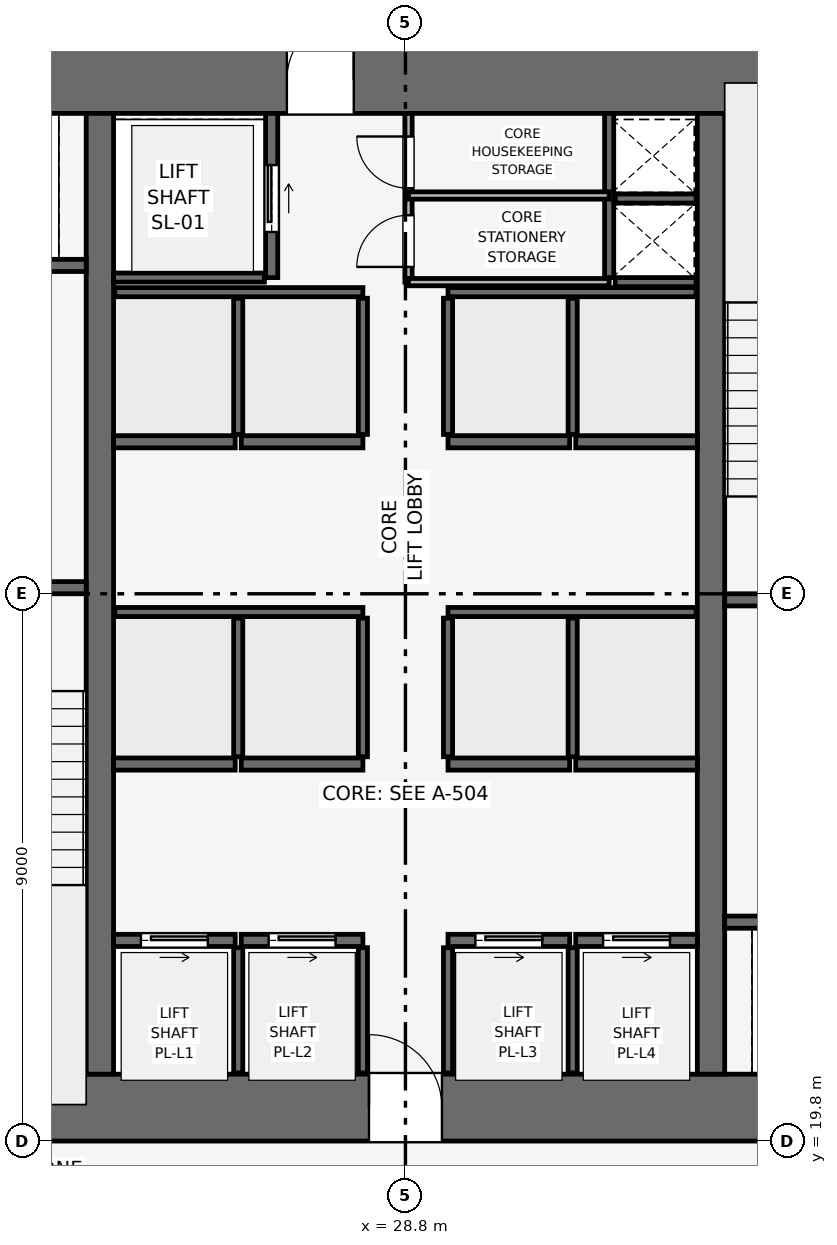
"""IFC4 building model, lengths in metres.
Left out: names, types, materials, properties, quantities, classifications, styles, units other than length and angle.
Written with IfcOpenShell. Run it as: python <this file> out.ifc"""

import sys

from ifc_helpers import new_model, si_unit, direction, frame, frame_2d, origin, place, context, subcontext, project, spatial, rectangle, extrude, element, fill, save


model = new_model("IFC4")
c1 = context("Model", 3, precision=1e-05, world=origin(), true_north=direction((0.0, 1.0)))
c2 = subcontext(c1, "Body", "Model", "MODEL_VIEW")
j1 = project(units=[si_unit("LENGTHUNIT", "METRE"), si_unit("PLANEANGLEUNIT", "RADIAN")], contexts=[c1])
p1 = place(None, origin())
s1 = spatial("IfcSite", under=j1, at=p1, CompositionType="ELEMENT")
p2 = place(p1, origin())
s2 = spatial("IfcBuilding", under=s1, at=p2, CompositionType="ELEMENT")
p3 = place(p2, frame((0.0, 0.0, 45.6)))
s3 = spatial("IfcBuildingStorey", under=s2, at=p3, CompositionType="ELEMENT", Elevation=45.6)
p4 = place(p3, frame((19.8, 20.35, 0.0), z_axis=(0.0, 0.0, 1.0), x_axis=(1.0, 0.0, 0.0)))
e1 = element("IfcWall", 1, at=p4, inside=s3, PredefinedType="SHEAR", context=c2, shape_type="SweptSolid", body=[
    extrude(rectangle(XDim=18.0, YDim=1.1, at=frame_2d((9.0, 0.0))), origin(), (0.0, 0.0, 1.0), 3.9),
])
p5 = place(p4, frame((8.4, 0.0, 0.0)))
e2 = element("IfcOpeningElement", 2, at=p5, cuts=e1, PredefinedType="OPENING", context=c2, shape_type="SweptSolid", body=[
    extrude(rectangle(XDim=1.2, YDim=2.2, at=frame_2d((0.6, 1.1))), frame((0.0, 0.56, 0.0), z_axis=(0.0, -1.0, 0.0), x_axis=(1.0, 0.0, 0.0)), (0.0, 0.0, 1.0), 1.12),
])
p6 = place(p3, frame((19.8, 37.25, 0.0), z_axis=(0.0, 0.0, 1.0), x_axis=(1.0, 0.0, 0.0)))
e3 = element("IfcWall", 3, at=p6, inside=s3, PredefinedType="SHEAR", context=c2, shape_type="SweptSolid", body=[
    extrude(rectangle(XDim=18.0, YDim=1.1, at=frame_2d((9.0, 0.0))), origin(), (0.0, 0.0, 1.0), 3.9),
])
p7 = place(p6, frame((7.05, 0.0, 0.0)))
e4 = element("IfcOpeningElement", 4, at=p7, cuts=e3, PredefinedType="OPENING", context=c2, shape_type="SweptSolid", body=[
    extrude(rectangle(XDim=1.1, YDim=2.15, at=frame_2d((0.55, 1.075))), frame((0.0, 0.56, 0.0), z_axis=(0.0, -1.0, 0.0), x_axis=(1.0, 0.0, 0.0)), (0.0, 0.0, 1.0), 1.12),
])
for number, where, z_axis, x_axis in (
    (5, (23.775, 20.9, 0.0), (0.0, 0.0, 1.0), (0.0, 1.0, 0.0)),
    (6, (33.825, 20.9, 0.0), (0.0, 0.0, 1.0), (0.0, 1.0, 0.0)),
):
    element("IfcWall", number, at=place(p3, frame(where, z_axis=z_axis, x_axis=x_axis)), inside=s3, PredefinedType="SHEAR", context=c2, shape_type="SweptSolid", body=[
        extrude(rectangle(XDim=15.8, YDim=0.45, at=frame_2d((7.9, 0.0))), origin(), (0.0, 0.0, 1.0), 3.9),
    ])
p8 = place(p3, frame((20.4, 28.9, 0.0), z_axis=(0.0, 0.0, 1.0), x_axis=(1.0, 0.0, 0.0)))
e7 = element("IfcWall", 7, at=p8, inside=s3, PredefinedType="SHEAR", context=c2, shape_type="SweptSolid", body=[
    extrude(rectangle(XDim=3.15, YDim=0.2, at=frame_2d((1.575, 0.0))), origin(), (0.0, 0.0, 1.0), 3.65),
])
p9 = place(p8, frame((0.8, 0.0, 0.0)))
e8 = element("IfcOpeningElement", 8, at=p9, cuts=e7, PredefinedType="OPENING", context=c2, shape_type="SweptSolid", body=[
    extrude(rectangle(XDim=1.0, YDim=2.1, at=frame_2d((0.5, 1.05))), frame((0.0, 0.11, 0.0), z_axis=(0.0, -1.0, 0.0), x_axis=(1.0, 0.0, 0.0)), (0.0, 0.0, 1.0), 0.22),
])
p10 = place(p3, frame((34.05, 28.7, 0.0), z_axis=(0.0, 0.0, 1.0), x_axis=(1.0, 0.0, 0.0)))
e9 = element("IfcWall", 9, at=p10, inside=s3, PredefinedType="SHEAR", context=c2, shape_type="SweptSolid", body=[
    extrude(rectangle(XDim=3.15, YDim=0.2, at=frame_2d((1.575, 0.0))), origin(), (0.0, 0.0, 1.0), 3.65),
])
p11 = place(p10, frame((0.8, 0.0, 0.0)))
e10 = element("IfcOpeningElement", 10, at=p11, cuts=e9, PredefinedType="OPENING", context=c2, shape_type="SweptSolid", body=[
    extrude(rectangle(XDim=1.0, YDim=2.1, at=frame_2d((0.5, 1.05))), frame((0.0, 0.11, 0.0), z_axis=(0.0, -1.0, 0.0), x_axis=(1.0, 0.0, 0.0)), (0.0, 0.0, 1.0), 0.22),
])
p12 = place(p3, frame((32.15, 34.0, 0.0), z_axis=(0.0, 0.0, 1.0), x_axis=(0.0, 1.0, 0.0)))
e11 = element("IfcWall", 11, at=p12, inside=s3, PredefinedType="SHEAR", context=c2, shape_type="SweptSolid", body=[
    extrude(rectangle(XDim=2.7, YDim=0.15, at=frame_2d((1.35, 0.0))), origin(), (0.0, 0.0, 1.0), 3.65),
])
for number, where, z_axis, x_axis in (
    (12, (32.25, 33.925, 0.0), (0.0, 0.0, 1.0), (1.0, 0.0, 0.0)),
    (13, (32.25, 35.3, 0.0), (0.0, 0.0, 1.0), (1.0, 0.0, 0.0)),
):
    element("IfcWall", number, at=place(p3, frame(where, z_axis=z_axis, x_axis=x_axis)), inside=s3, PredefinedType="SHEAR", context=c2, shape_type="SweptSolid", body=[
        extrude(rectangle(XDim=1.33, YDim=0.15, at=frame_2d((0.665, 0.0))), origin(), (0.0, 0.0, 1.0), 3.65),
    ])
p13 = place(p3, frame((20.5, 34.2, 0.0), z_axis=(0.0, 0.0, 1.0), x_axis=(1.0, 0.0, 0.0)))
e14 = element("IfcWall", 14, at=p13, inside=s3, PredefinedType="SHEAR", context=c2, shape_type="SweptSolid", body=[
    extrude(rectangle(XDim=3.05, YDim=0.2, at=frame_2d((1.525, 0.0))), origin(), (0.0, 0.0, 1.0), 3.65),
])
p14 = place(p13, frame((0.75, 0.0, 0.0)))
e15 = element("IfcOpeningElement", 15, at=p14, cuts=e14, PredefinedType="OPENING", context=c2, shape_type="SweptSolid", body=[
    extrude(rectangle(XDim=1.1, YDim=2.15, at=frame_2d((0.55, 1.075))), frame((0.0, 0.11, 0.0), z_axis=(0.0, -1.0, 0.0), x_axis=(1.0, 0.0, 0.0)), (0.0, 0.0, 1.0), 0.22),
])
p15 = place(p3, frame((34.05, 23.4, 0.0), z_axis=(0.0, 0.0, 1.0), x_axis=(1.0, 0.0, 0.0)))
e16 = element("IfcWall", 16, at=p15, inside=s3, PredefinedType="SHEAR", context=c2, shape_type="SweptSolid", body=[
    extrude(rectangle(XDim=3.05, YDim=0.2, at=frame_2d((1.525, 0.0))), origin(), (0.0, 0.0, 1.0), 3.65),
])
p16 = place(p15, frame((1.2, 0.0, 0.0)))
e17 = element("IfcOpeningElement", 17, at=p16, cuts=e16, PredefinedType="OPENING", context=c2, shape_type="SweptSolid", body=[
    extrude(rectangle(XDim=1.1, YDim=2.15, at=frame_2d((0.55, 1.075))), frame((0.0, 0.11, 0.0), z_axis=(0.0, -1.0, 0.0), x_axis=(1.0, 0.0, 0.0)), (0.0, 0.0, 1.0), 0.22),
])
p17 = place(p3, frame((26.6, 34.0, 0.0), z_axis=(0.0, 0.0, 1.0), x_axis=(0.0, 1.0, 0.0)))
e18 = element("IfcWall", 18, at=p17, inside=s3, PredefinedType="SHEAR", context=c2, shape_type="SweptSolid", body=[
    extrude(rectangle(XDim=2.7, YDim=0.2, at=frame_2d((1.35, 0.0))), origin(), (0.0, 0.0, 1.0), 3.65),
])
p18 = place(p17, frame((0.75, 0.0, 0.0)))
e19 = element("IfcOpeningElement", 19, at=p18, cuts=e18, PredefinedType="OPENING", context=c2, shape_type="SweptSolid", body=[
    extrude(rectangle(XDim=1.1, YDim=2.15, at=frame_2d((0.55, 1.075))), frame((0.0, 0.11, 0.0), z_axis=(0.0, -1.0, 0.0), x_axis=(1.0, 0.0, 0.0)), (0.0, 0.0, 1.0), 0.22),
])
p19 = place(p3, frame((24.0, 34.0, 0.0), z_axis=(0.0, 0.0, 1.0), x_axis=(1.0, 0.0, 0.0)))
e20 = element("IfcWall", 20, at=p19, inside=s3, PredefinedType="SHEAR", context=c2, shape_type="SweptSolid", body=[
    extrude(rectangle(XDim=2.48, YDim=0.15, at=frame_2d((1.24, 0.0))), origin(), (0.0, 0.0, 1.0), 3.65),
])
p20 = place(p3, frame((24.0, 23.1, 0.0), z_axis=(0.0, 0.0, 1.0), x_axis=(1.0, 0.0, 0.0)))
e21 = element("IfcWall", 21, at=p20, inside=s3, PredefinedType="SHEAR", context=c2, shape_type="SweptSolid", body=[
    extrude(rectangle(XDim=2.0, YDim=0.2, at=frame_2d((1.0, 0.0))), origin(), (0.0, 0.0, 1.0), 3.65),
])
p21 = place(p20, frame((0.45, 0.0, 0.0)))
e22 = element("IfcOpeningElement", 22, at=p21, cuts=e21, PredefinedType="OPENING", context=c2, shape_type="SweptSolid", body=[
    extrude(rectangle(XDim=1.1, YDim=2.15, at=frame_2d((0.55, 1.075))), frame((0.0, 0.11, 0.0), z_axis=(0.0, -1.0, 0.0), x_axis=(1.0, 0.0, 0.0)), (0.0, 0.0, 1.0), 0.22),
])
p22 = place(p3, frame((26.1, 23.1, 0.0), z_axis=(0.0, 0.0, 1.0), x_axis=(1.0, 0.0, 0.0)))
e23 = element("IfcWall", 23, at=p22, inside=s3, PredefinedType="SHEAR", context=c2, shape_type="SweptSolid", body=[
    extrude(rectangle(XDim=2.0, YDim=0.2, at=frame_2d((1.0, 0.0))), origin(), (0.0, 0.0, 1.0), 3.65),
])
p23 = place(p22, frame((0.45, 0.0, 0.0)))
e24 = element("IfcOpeningElement", 24, at=p23, cuts=e23, PredefinedType="OPENING", context=c2, shape_type="SweptSolid", body=[
    extrude(rectangle(XDim=1.1, YDim=2.15, at=frame_2d((0.55, 1.075))), frame((0.0, 0.11, 0.0), z_axis=(0.0, -1.0, 0.0), x_axis=(1.0, 0.0, 0.0)), (0.0, 0.0, 1.0), 0.22),
])
p24 = place(p3, frame((29.5, 23.1, 0.0), z_axis=(0.0, 0.0, 1.0), x_axis=(1.0, 0.0, 0.0)))
e25 = element("IfcWall", 25, at=p24, inside=s3, PredefinedType="SHEAR", context=c2, shape_type="SweptSolid", body=[
    extrude(rectangle(XDim=2.0, YDim=0.2, at=frame_2d((1.0, 0.0))), origin(), (0.0, 0.0, 1.0), 3.65),
])
p25 = place(p24, frame((0.45, 0.0, 0.0)))
e26 = element("IfcOpeningElement", 26, at=p25, cuts=e25, PredefinedType="OPENING", context=c2, shape_type="SweptSolid", body=[
    extrude(rectangle(XDim=1.1, YDim=2.15, at=frame_2d((0.55, 1.075))), frame((0.0, 0.11, 0.0), z_axis=(0.0, -1.0, 0.0), x_axis=(1.0, 0.0, 0.0)), (0.0, 0.0, 1.0), 0.22),
])
p26 = place(p3, frame((31.6, 23.1, 0.0), z_axis=(0.0, 0.0, 1.0), x_axis=(1.0, 0.0, 0.0)))
e27 = element("IfcWall", 27, at=p26, inside=s3, PredefinedType="SHEAR", context=c2, shape_type="SweptSolid", body=[
    extrude(rectangle(XDim=2.0, YDim=0.2, at=frame_2d((1.0, 0.0))), origin(), (0.0, 0.0, 1.0), 3.65),
])
p27 = place(p26, frame((0.45, 0.0, 0.0)))
e28 = element("IfcOpeningElement", 28, at=p27, cuts=e27, PredefinedType="OPENING", context=c2, shape_type="SweptSolid", body=[
    extrude(rectangle(XDim=1.1, YDim=2.15, at=frame_2d((0.55, 1.075))), frame((0.0, 0.11, 0.0), z_axis=(0.0, -1.0, 0.0), x_axis=(1.0, 0.0, 0.0)), (0.0, 0.0, 1.0), 0.22),
])
for number, where, z_axis, x_axis in (
    (29, (24.0, 26.0, 0.0), (0.0, 0.0, 1.0), (1.0, 0.0, 0.0)),
    (30, (26.1, 26.0, 0.0), (0.0, 0.0, 1.0), (1.0, 0.0, 0.0)),
    (31, (29.5, 26.0, 0.0), (0.0, 0.0, 1.0), (1.0, 0.0, 0.0)),
    (32, (31.6, 26.0, 0.0), (0.0, 0.0, 1.0), (1.0, 0.0, 0.0)),
    (33, (24.0, 31.3, 0.0), (0.0, 0.0, 1.0), (1.0, 0.0, 0.0)),
    (34, (26.1, 31.3, 0.0), (0.0, 0.0, 1.0), (1.0, 0.0, 0.0)),
    (35, (29.5, 31.3, 0.0), (0.0, 0.0, 1.0), (1.0, 0.0, 0.0)),
    (36, (31.6, 31.3, 0.0), (0.0, 0.0, 1.0), (1.0, 0.0, 0.0)),
):
    element("IfcWall", number, at=place(p3, frame(where, z_axis=z_axis, x_axis=x_axis)), inside=s3, PredefinedType="SHEAR", context=c2, shape_type="SweptSolid", body=[
        extrude(rectangle(XDim=2.0, YDim=0.2, at=frame_2d((1.0, 0.0))), origin(), (0.0, 0.0, 1.0), 3.65),
    ])
for number, where, z_axis, x_axis in (
    (37, (26.05, 20.92, 0.0), (0.0, 0.0, 1.0), (0.0, 1.0, 0.0)),
    (38, (28.1, 20.92, 0.0), (0.0, 0.0, 1.0), (0.0, 1.0, 0.0)),
    (39, (29.5, 20.92, 0.0), (0.0, 0.0, 1.0), (0.0, 1.0, 0.0)),
    (40, (31.55, 20.92, 0.0), (0.0, 0.0, 1.0), (0.0, 1.0, 0.0)),
):
    element("IfcWall", number, at=place(p3, frame(where, z_axis=z_axis, x_axis=x_axis)), inside=s3, PredefinedType="SHEAR", context=c2, shape_type="SweptSolid", body=[
        extrude(rectangle(XDim=2.06, YDim=0.15, at=frame_2d((1.03, 0.0))), origin(), (0.0, 0.0, 1.0), 3.65),
    ])
for number, where, z_axis, x_axis in (
    (41, (24.02, 28.5, 0.0), (0.0, 0.0, 1.0), (1.0, 0.0, 0.0)),
    (42, (29.5, 28.5, 0.0), (0.0, 0.0, 1.0), (1.0, 0.0, 0.0)),
):
    element("IfcWall", number, at=place(p3, frame(where, z_axis=z_axis, x_axis=x_axis)), inside=s3, PredefinedType="SHEAR", context=c2, shape_type="SweptSolid", body=[
        extrude(rectangle(XDim=4.08, YDim=0.15, at=frame_2d((2.04, 0.0))), origin(), (0.0, 0.0, 1.0), 3.65),
    ])
for number, where, z_axis, x_axis in (
    (43, (26.05, 26.12, 0.0), (0.0, 0.0, 1.0), (0.0, 1.0, 0.0)),
    (44, (28.1, 26.12, 0.0), (0.0, 0.0, 1.0), (0.0, 1.0, 0.0)),
    (45, (29.5, 26.12, 0.0), (0.0, 0.0, 1.0), (0.0, 1.0, 0.0)),
    (46, (31.55, 26.12, 0.0), (0.0, 0.0, 1.0), (0.0, 1.0, 0.0)),
):
    element("IfcWall", number, at=place(p3, frame(where, z_axis=z_axis, x_axis=x_axis)), inside=s3, PredefinedType="SHEAR", context=c2, shape_type="SweptSolid", body=[
        extrude(rectangle(XDim=2.28, YDim=0.15, at=frame_2d((1.14, 0.0))), origin(), (0.0, 0.0, 1.0), 3.65),
    ])
for number, where, z_axis, x_axis in (
    (47, (24.02, 33.76, 0.0), (0.0, 0.0, 1.0), (1.0, 0.0, 0.0)),
    (48, (29.5, 33.76, 0.0), (0.0, 0.0, 1.0), (1.0, 0.0, 0.0)),
):
    element("IfcWall", number, at=place(p3, frame(where, z_axis=z_axis, x_axis=x_axis)), inside=s3, PredefinedType="SHEAR", context=c2, shape_type="SweptSolid", body=[
        extrude(rectangle(XDim=4.08, YDim=0.15, at=frame_2d((2.04, 0.0))), origin(), (0.0, 0.0, 1.0), 3.65),
    ])
for number, where, z_axis, x_axis in (
    (49, (26.05, 31.42, 0.0), (0.0, 0.0, 1.0), (0.0, 1.0, 0.0)),
    (50, (28.1, 31.42, 0.0), (0.0, 0.0, 1.0), (0.0, 1.0, 0.0)),
    (51, (29.5, 31.42, 0.0), (0.0, 0.0, 1.0), (0.0, 1.0, 0.0)),
    (52, (31.55, 31.42, 0.0), (0.0, 0.0, 1.0), (0.0, 1.0, 0.0)),
):
    element("IfcWall", number, at=place(p3, frame(where, z_axis=z_axis, x_axis=x_axis)), inside=s3, PredefinedType="SHEAR", context=c2, shape_type="SweptSolid", body=[
        extrude(rectangle(XDim=2.24, YDim=0.15, at=frame_2d((1.12, 0.0))), origin(), (0.0, 0.0, 1.0), 3.65),
    ])
p28 = place(p3, frame((28.85, 33.925, 0.0), z_axis=(0.0, 0.0, 1.0), x_axis=(0.0, 1.0, 0.0)))
e53 = element("IfcWall", 53, at=p28, inside=s3, PredefinedType="PARTITIONING", context=c2, shape_type="SweptSolid", body=[
    extrude(rectangle(XDim=2.775, YDim=0.12, at=frame_2d((1.387, 0.0))), origin(), (0.0, 0.0, 1.0), 3.65),
])
p29 = place(p28, frame((0.25, 0.0, 0.0)))
e54 = element("IfcOpeningElement", 54, at=p29, cuts=e53, PredefinedType="OPENING", context=c2, shape_type="SweptSolid", body=[
    extrude(rectangle(XDim=0.85, YDim=2.1, at=frame_2d((0.425, 1.05))), frame((0.0, 0.07, 0.0), z_axis=(0.0, -1.0, 0.0), x_axis=(1.0, 0.0, 0.0)), (0.0, 0.0, 1.0), 0.14),
])
p30 = place(p28, frame((1.545, 0.0, 0.0)))
e55 = element("IfcOpeningElement", 55, at=p30, cuts=e53, PredefinedType="OPENING", context=c2, shape_type="SweptSolid", body=[
    extrude(rectangle(XDim=0.85, YDim=2.1, at=frame_2d((0.425, 1.05))), frame((0.0, 0.07, 0.0), z_axis=(0.0, -1.0, 0.0), x_axis=(1.0, 0.0, 0.0)), (0.0, 0.0, 1.0), 0.14),
])
for number, where, z_axis, x_axis in (
    (56, (28.85, 35.35, 0.0), (0.0, 0.0, 1.0), (1.0, 0.0, 0.0)),
    (57, (28.85, 33.925, 0.0), (0.0, 0.0, 1.0), (1.0, 0.0, 0.0)),
):
    element("IfcWall", number, at=place(p3, frame(where, z_axis=z_axis, x_axis=x_axis)), inside=s3, PredefinedType="PARTITIONING", context=c2, shape_type="SweptSolid", body=[
        extrude(rectangle(XDim=3.3, YDim=0.12, at=frame_2d((1.65, 0.0))), origin(), (0.0, 0.0, 1.0), 3.65),
    ])
p31 = place(p18, origin())
e58 = element("IfcDoor", 58, at=p31, inside=s3, OperationType="SLIDING_TO_RIGHT", PredefinedType="DOOR", context=c2, shape_type="SweptSolid", body=[
    extrude(rectangle(XDim=1.1, YDim=2.15, at=frame_2d((0.55, 1.075))), frame((0.0, 0.025, 0.0), z_axis=(0.0, -1.0, 0.0), x_axis=(1.0, 0.0, 0.0)), (0.0, 0.0, 1.0), 0.05),
])
fill(e19, e58)
p32 = place(p21, origin())
e59 = element("IfcDoor", 59, at=p32, inside=s3, OperationType="SLIDING_TO_RIGHT", PredefinedType="DOOR", context=c2, shape_type="SweptSolid", body=[
    extrude(rectangle(XDim=1.1, YDim=2.15, at=frame_2d((0.55, 1.075))), frame((0.0, 0.025, 0.0), z_axis=(0.0, -1.0, 0.0), x_axis=(1.0, 0.0, 0.0)), (0.0, 0.0, 1.0), 0.05),
])
fill(e22, e59)
p33 = place(p23, origin())
e60 = element("IfcDoor", 60, at=p33, inside=s3, OperationType="SLIDING_TO_RIGHT", PredefinedType="DOOR", context=c2, shape_type="SweptSolid", body=[
    extrude(rectangle(XDim=1.1, YDim=2.15, at=frame_2d((0.55, 1.075))), frame((0.0, 0.025, 0.0), z_axis=(0.0, -1.0, 0.0), x_axis=(1.0, 0.0, 0.0)), (0.0, 0.0, 1.0), 0.05),
])
fill(e24, e60)
p34 = place(p25, origin())
e61 = element("IfcDoor", 61, at=p34, inside=s3, OperationType="SLIDING_TO_RIGHT", PredefinedType="DOOR", context=c2, shape_type="SweptSolid", body=[
    extrude(rectangle(XDim=1.1, YDim=2.15, at=frame_2d((0.55, 1.075))), frame((0.0, 0.025, 0.0), z_axis=(0.0, -1.0, 0.0), x_axis=(1.0, 0.0, 0.0)), (0.0, 0.0, 1.0), 0.05),
])
fill(e26, e61)
p35 = place(p27, origin())
e62 = element("IfcDoor", 62, at=p35, inside=s3, OperationType="SLIDING_TO_RIGHT", PredefinedType="DOOR", context=c2, shape_type="SweptSolid", body=[
    extrude(rectangle(XDim=1.1, YDim=2.15, at=frame_2d((0.55, 1.075))), frame((0.0, 0.025, 0.0), z_axis=(0.0, -1.0, 0.0), x_axis=(1.0, 0.0, 0.0)), (0.0, 0.0, 1.0), 0.05),
])
fill(e28, e62)
p36 = place(p29, origin())
e63 = element("IfcDoor", 63, at=p36, inside=s3, OperationType="SINGLE_SWING_LEFT", PredefinedType="DOOR", context=c2, shape_type="SweptSolid", body=[
    extrude(rectangle(XDim=0.85, YDim=2.1, at=frame_2d((0.425, 1.05))), frame((0.0, 0.025, 0.0), z_axis=(0.0, -1.0, 0.0), x_axis=(1.0, 0.0, 0.0)), (0.0, 0.0, 1.0), 0.05),
])
fill(e54, e63)
p37 = place(p30, origin())
e64 = element("IfcDoor", 64, at=p37, inside=s3, OperationType="SINGLE_SWING_RIGHT", PredefinedType="DOOR", context=c2, shape_type="SweptSolid", body=[
    extrude(rectangle(XDim=0.85, YDim=2.1, at=frame_2d((0.425, 1.05))), frame((0.0, 0.025, 0.0), z_axis=(0.0, -1.0, 0.0), x_axis=(1.0, 0.0, 0.0)), (0.0, 0.0, 1.0), 0.05),
])
fill(e55, e64)
p38 = place(p5, origin())
e65 = element("IfcDoor", 65, at=p38, inside=s3, OperationType="SINGLE_SWING_LEFT", PredefinedType="DOOR", context=c2, shape_type="SweptSolid", body=[
    extrude(rectangle(XDim=1.2, YDim=2.2, at=frame_2d((0.6, 1.1))), frame((0.0, 0.025, 0.0), z_axis=(0.0, -1.0, 0.0), x_axis=(1.0, 0.0, 0.0)), (0.0, 0.0, 1.0), 0.05),
])
fill(e2, e65)
p39 = place(p7, origin())
e66 = element("IfcDoor", 66, at=p39, inside=s3, OperationType="SINGLE_SWING_RIGHT", PredefinedType="DOOR", context=c2, shape_type="SweptSolid", body=[
    extrude(rectangle(XDim=1.1, YDim=2.15, at=frame_2d((0.55, 1.075))), frame((0.0, 0.025, 0.0), z_axis=(0.0, -1.0, 0.0), x_axis=(1.0, 0.0, 0.0)), (0.0, 0.0, 1.0), 0.05),
])
fill(e4, e66)
save(model, sys.argv[1])
